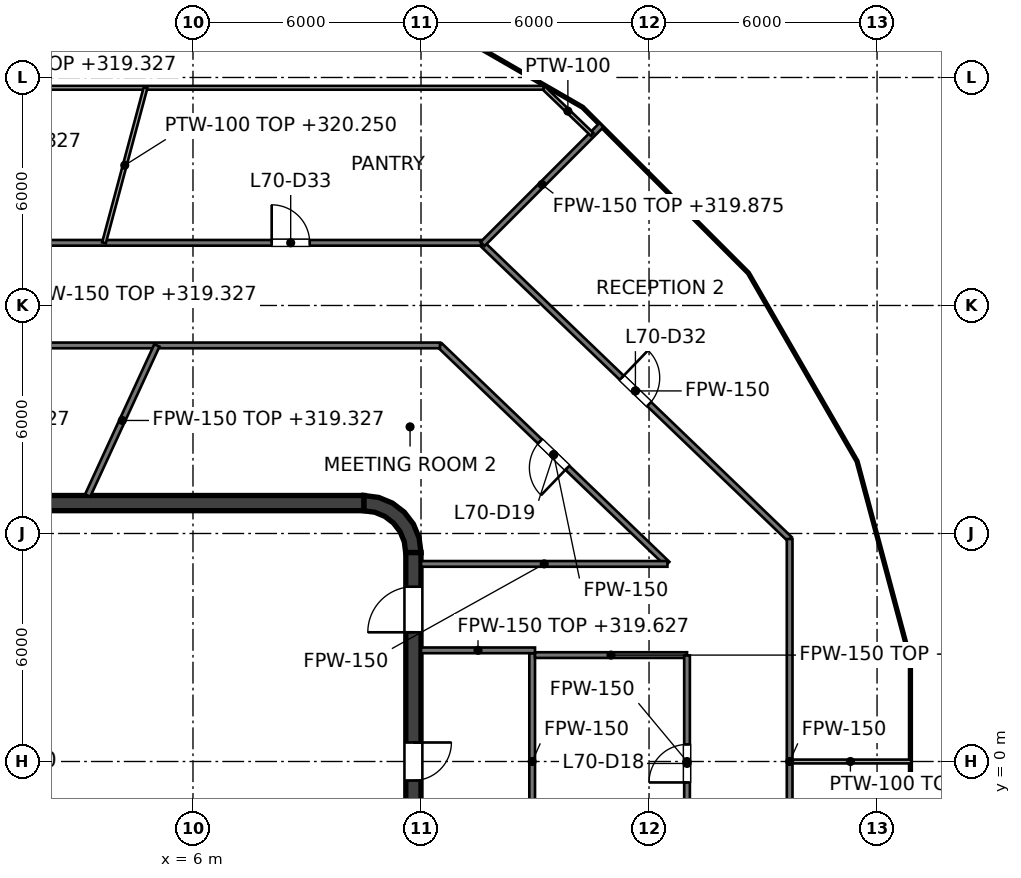
"""IFC4 building model, lengths in metres.
Left out: names, types, materials, properties, quantities, classifications, styles, units other than length and angle.
Written with IfcOpenShell. Run it as: python <this file> out.ifc"""

import sys

from ifc_helpers import new_model, si_unit, direction, frame, frame_2d, origin, place, context, subcontext, project, spatial, polyline, rectangle, outline, extrude, element, fill, save


model = new_model("IFC4")
c1 = context("Model", 3, precision=1e-05, world=origin(), true_north=direction((0.0, 1.0)))
c2 = subcontext(c1, "Body", "Model", "MODEL_VIEW")
j1 = project(units=[si_unit("LENGTHUNIT", "METRE"), si_unit("PLANEANGLEUNIT", "RADIAN")], contexts=[c1])
p1 = place(None, origin())
s1 = spatial("IfcSite", under=j1, at=p1, CompositionType="ELEMENT")
p2 = place(p1, origin())
s2 = spatial("IfcBuilding", under=s1, at=p2, CompositionType="ELEMENT")
p3 = place(p2, frame((0.0, 0.0, 316.4)))
s3 = spatial("IfcBuildingStorey", under=s2, at=p3, CompositionType="ELEMENT", Elevation=316.4)
p4 = place(p3, frame((-10.5, 6.8, 0.0), z_axis=(0.0, 0.0, 1.0), x_axis=(1.0, 0.0, 0.0)))
e1 = element("IfcWall", 1, at=p4, inside=s3, PredefinedType="SHEAR", context=c2, shape_type="SweptSolid", body=[
    extrude(rectangle(XDim=21.0, YDim=0.4, at=frame_2d((10.5, 0.0))), origin(), (0.0, 0.0, 1.0), 4.0),
])
p5 = place(p3, frame((11.8, -5.5, 0.0), z_axis=(0.0, 0.0, 1.0), x_axis=(0.0, 1.0, 0.0)))
e2 = element("IfcWall", 2, at=p5, inside=s3, PredefinedType="SHEAR", context=c2, shape_type="SweptSolid", body=[
    extrude(rectangle(XDim=11.0, YDim=0.4, at=frame_2d((5.5, 0.0))), origin(), (0.0, 0.0, 1.0), 4.0),
])
p6 = place(p5, frame((5.0, 0.0, 0.0)))
e3 = element("IfcOpeningElement", 3, at=p6, cuts=e2, PredefinedType="OPENING", context=c2, shape_type="SweptSolid", body=[
    extrude(rectangle(XDim=1.0, YDim=2.1, at=frame_2d((0.5, 1.05))), frame((0.0, 0.2, 0.0), z_axis=(0.0, -1.0, 0.0), x_axis=(1.0, 0.0, 0.0)), (0.0, 0.0, 1.0), 0.4),
])
p7 = place(p5, frame((0.9, 0.0, 0.0)))
e4 = element("IfcOpeningElement", 4, at=p7, cuts=e2, PredefinedType="OPENING", context=c2, shape_type="SweptSolid", body=[
    extrude(rectangle(XDim=1.2, YDim=2.1, at=frame_2d((0.6, 1.05))), frame((0.0, 0.2, 0.0), z_axis=(0.0, -1.0, 0.0), x_axis=(1.0, 0.0, 0.0)), (0.0, 0.0, 1.0), 0.4),
])
p8 = place(p5, frame((8.9, 0.0, 0.0)))
e5 = element("IfcOpeningElement", 5, at=p8, cuts=e2, PredefinedType="OPENING", context=c2, shape_type="SweptSolid", body=[
    extrude(rectangle(XDim=1.2, YDim=2.1, at=frame_2d((0.6, 1.05))), frame((0.0, 0.2, 0.0), z_axis=(0.0, -1.0, 0.0), x_axis=(1.0, 0.0, 0.0)), (0.0, 0.0, 1.0), 0.4),
])
p9 = place(p3, origin())
e6 = element("IfcWall", 6, at=p9, inside=s3, PredefinedType="SHEAR", context=c2, shape_type="SweptSolid", body=[
    extrude(outline(polyline([(10.5, 7.0), (10.5, 6.596), (10.784, 6.559), (11.048, 6.45), (11.275, 6.275), (11.45, 6.048), (11.559, 5.784), (11.596, 5.5), (12.0, 5.5), (11.949, 5.888), (11.799, 6.25), (11.561, 6.561), (11.25, 6.799), (10.888, 6.949), (10.5, 7.0)])), origin(), (0.0, 0.0, 1.0), 4.0),
])
p10 = place(p3, frame((9.0, 4.1, 0.0), z_axis=(0.0, 0.0, 1.0), x_axis=(0.0, 1.0, 0.0)))
e7 = element("IfcWall", 7, at=p10, inside=s3, PredefinedType="SOLIDWALL", context=c2, shape_type="SweptSolid", body=[
    extrude(rectangle(XDim=2.5, YDim=0.25, at=frame_2d((1.25, 0.0))), origin(), (0.0, 0.0, 1.0), 3.85),
])
p11 = place(p10, frame((0.65, 0.0, 0.0)))
e8 = element("IfcOpeningElement", 8, at=p11, cuts=e7, PredefinedType="OPENING", context=c2, shape_type="SweptSolid", body=[
    extrude(rectangle(XDim=1.2, YDim=2.1, at=frame_2d((0.6, 1.05))), frame((0.0, 0.125, 0.0), z_axis=(0.0, -1.0, 0.0), x_axis=(1.0, 0.0, 0.0)), (0.0, 0.0, 1.0), 0.25),
])
p12 = place(p3, frame((3.15, 4.1, 0.0), z_axis=(0.0, 0.0, 1.0), x_axis=(0.0, 1.0, 0.0)))
e9 = element("IfcWall", 9, at=p12, inside=s3, PredefinedType="SOLIDWALL", context=c2, shape_type="SweptSolid", body=[
    extrude(rectangle(XDim=2.5, YDim=0.25, at=frame_2d((1.25, 0.0))), origin(), (0.0, 0.0, 1.0), 3.85),
])
p13 = place(p3, frame((0.775, 1.525, 0.0), z_axis=(0.0, 0.0, 1.0), x_axis=(1.0, 0.0, 0.0)))
e10 = element("IfcWall", 10, at=p13, inside=s3, PredefinedType="SOLIDWALL", context=c2, shape_type="SweptSolid", body=[
    extrude(rectangle(XDim=8.35, YDim=0.25, at=frame_2d((4.175, 0.0))), origin(), (0.0, 0.0, 1.0), 3.85),
])
p14 = place(p13, frame((0.925, 0.0, 0.0)))
e11 = element("IfcOpeningElement", 11, at=p14, cuts=e10, PredefinedType="OPENING", context=c2, shape_type="SweptSolid", body=[
    extrude(rectangle(XDim=1.1, YDim=2.1, at=frame_2d((0.55, 1.05))), frame((0.0, 0.125, 0.0), z_axis=(0.0, -1.0, 0.0), x_axis=(1.0, 0.0, 0.0)), (0.0, 0.0, 1.0), 0.25),
])
p15 = place(p13, frame((3.625, 0.0, 0.0)))
e12 = element("IfcOpeningElement", 12, at=p15, cuts=e10, PredefinedType="OPENING", context=c2, shape_type="SweptSolid", body=[
    extrude(rectangle(XDim=1.1, YDim=2.1, at=frame_2d((0.55, 1.05))), frame((0.0, 0.125, 0.0), z_axis=(0.0, -1.0, 0.0), x_axis=(1.0, 0.0, 0.0)), (0.0, 0.0, 1.0), 0.25),
])
p16 = place(p13, frame((6.325, 0.0, 0.0)))
e13 = element("IfcOpeningElement", 13, at=p16, cuts=e10, PredefinedType="OPENING", context=c2, shape_type="SweptSolid", body=[
    extrude(rectangle(XDim=1.1, YDim=2.1, at=frame_2d((0.55, 1.05))), frame((0.0, 0.125, 0.0), z_axis=(0.0, -1.0, 0.0), x_axis=(1.0, 0.0, 0.0)), (0.0, 0.0, 1.0), 0.25),
])
p17 = place(p3, frame((0.775, 3.975, 0.0), z_axis=(0.0, 0.0, 1.0), x_axis=(1.0, 0.0, 0.0)))
e14 = element("IfcWall", 14, at=p17, inside=s3, PredefinedType="SOLIDWALL", context=c2, shape_type="SweptSolid", body=[
    extrude(rectangle(XDim=8.35, YDim=0.25, at=frame_2d((4.175, 0.0))), origin(), (0.0, 0.0, 1.0), 3.85),
])
for number, where, z_axis, x_axis in (
    (15, (9.0, 1.65, 0.0), (0.0, 0.0, 1.0), (0.0, 1.0, 0.0)),
    (16, (6.3, 1.65, 0.0), (0.0, 0.0, 1.0), (0.0, 1.0, 0.0)),
    (17, (3.6, 1.65, 0.0), (0.0, 0.0, 1.0), (0.0, 1.0, 0.0)),
):
    element("IfcWall", number, at=place(p3, frame(where, z_axis=z_axis, x_axis=x_axis)), inside=s3, PredefinedType="SOLIDWALL", context=c2, shape_type="SweptSolid", body=[
        extrude(rectangle(XDim=2.2, YDim=0.25, at=frame_2d((1.1, 0.0))), origin(), (0.0, 0.0, 1.0), 3.85),
    ])
p18 = place(p3, frame((14.925, -2.85, 0.0), z_axis=(0.0, 0.0, 1.0), x_axis=(0.0, 1.0, 0.0)))
e18 = element("IfcWall", 18, at=p18, inside=s3, PredefinedType="PARTITIONING", context=c2, shape_type="SweptSolid", body=[
    extrude(rectangle(XDim=5.7, YDim=0.15, at=frame_2d((2.85, 0.0))), origin(), (0.0, 0.0, 1.0), 3.076),
])
p19 = place(p3, frame((12.0, 2.925, 0.0), z_axis=(0.0, 0.0, 1.0), x_axis=(1.0, 0.0, 0.0)))
e19 = element("IfcWall", 19, at=p19, inside=s3, PredefinedType="PARTITIONING", context=c2, shape_type="SweptSolid", body=[
    extrude(rectangle(XDim=3.0, YDim=0.15, at=frame_2d((1.5, 0.0))), origin(), (0.0, 0.0, 1.0), 3.228),
])
p20 = place(p3, frame((12.498, 10.949, 0.0), z_axis=(0.0, 0.0, 1.0), x_axis=(0.721258572397, -0.692665916401, 0.0)))
e20 = element("IfcWall", 20, at=p20, inside=s3, PredefinedType="PARTITIONING", context=c2, shape_type="SweptSolid", body=[
    extrude(rectangle(XDim=8.3, YDim=0.15, at=frame_2d((4.15, 0.0))), origin(), (0.0, 0.0, 1.0), 3.076),
])
p21 = place(p20, frame((3.649, 0.0, 0.0)))
e21 = element("IfcOpeningElement", 21, at=p21, cuts=e20, PredefinedType="OPENING", context=c2, shape_type="SweptSolid", body=[
    extrude(rectangle(XDim=1.0, YDim=2.1, at=frame_2d((0.5, 1.05))), frame((0.0, 0.075, 0.0), z_axis=(0.0, -1.0, 0.0), x_axis=(1.0, 0.0, 0.0)), (0.0, 0.0, 1.0), 0.15),
])
p22 = place(p3, frame((13.584, 13.649, 0.0), z_axis=(0.0, 0.0, 1.0), x_axis=(0.721271112153, -0.692652858778, 0.0)))
e22 = element("IfcWall", 22, at=p22, inside=s3, PredefinedType="PARTITIONING", context=c2, shape_type="SweptSolid", body=[
    extrude(rectangle(XDim=11.252, YDim=0.15, at=frame_2d((5.626, 0.0))), origin(), (0.0, 0.0, 1.0), 3.076),
])
p23 = place(p22, frame((5.126, 0.0, 0.0)))
e23 = element("IfcOpeningElement", 23, at=p23, cuts=e22, PredefinedType="OPENING", context=c2, shape_type="SweptSolid", body=[
    extrude(rectangle(XDim=1.0, YDim=2.1, at=frame_2d((0.5, 1.05))), frame((0.0, 0.075, 0.0), z_axis=(0.0, -1.0, 0.0), x_axis=(1.0, 0.0, 0.0)), (0.0, 0.0, 1.0), 0.15),
])
p24 = place(p3, frame((15.0, 2.8, 0.0), z_axis=(0.0, 0.0, 1.0), x_axis=(1.0, 0.0, 0.0)))
e24 = element("IfcWall", 24, at=p24, inside=s3, PredefinedType="PARTITIONING", context=c2, shape_type="SweptSolid", body=[
    extrude(rectangle(XDim=4.0, YDim=0.15, at=frame_2d((2.0, 0.0))), origin(), (0.0, 0.0, 1.0), 3.85),
])
p25 = place(p3, frame((12.0, 5.2, 0.0), z_axis=(0.0, 0.0, 1.0), x_axis=(1.0, 0.0, 0.0)))
e25 = element("IfcWall", 25, at=p25, inside=s3, PredefinedType="PARTITIONING", context=c2, shape_type="SweptSolid", body=[
    extrude(rectangle(XDim=6.484, YDim=0.15, at=frame_2d((3.242, 0.0))), origin(), (0.0, 0.0, 1.0), 3.076),
])
p26 = place(p3, frame((-12.498, 10.949, 0.0), z_axis=(0.0, 0.0, 1.0), x_axis=(1.0, 0.0, 0.0)))
e26 = element("IfcWall", 26, at=p26, inside=s3, PredefinedType="PARTITIONING", context=c2, shape_type="SweptSolid", body=[
    extrude(rectangle(XDim=24.996, YDim=0.15, at=frame_2d((12.498, 0.0))), origin(), (0.0, 0.0, 1.0), 2.927),
])
p27 = place(p26, frame((11.948, 0.0, 0.0)))
e27 = element("IfcOpeningElement", 27, at=p27, cuts=e26, PredefinedType="OPENING", context=c2, shape_type="SweptSolid", body=[
    extrude(rectangle(XDim=1.0, YDim=2.1, at=frame_2d((0.5, 1.05))), frame((0.0, 0.075, 0.0), z_axis=(0.0, -1.0, 0.0), x_axis=(1.0, 0.0, 0.0)), (0.0, 0.0, 1.0), 0.15),
])
p28 = place(p3, frame((-13.584, 13.649, 0.0), z_axis=(0.0, 0.0, 1.0), x_axis=(1.0, 0.0, 0.0)))
e28 = element("IfcWall", 28, at=p28, inside=s3, PredefinedType="PARTITIONING", context=c2, shape_type="SweptSolid", body=[
    extrude(rectangle(XDim=27.168, YDim=0.15, at=frame_2d((13.584, 0.0))), origin(), (0.0, 0.0, 1.0), 2.927),
])
p29 = place(p28, frame((21.655, 0.0, 0.0)))
e29 = element("IfcOpeningElement", 29, at=p29, cuts=e28, PredefinedType="OPENING", context=c2, shape_type="SweptSolid", body=[
    extrude(rectangle(XDim=1.0, YDim=2.1, at=frame_2d((0.5, 1.05))), frame((0.0, 0.075, 0.0), z_axis=(0.0, -1.0, 0.0), x_axis=(1.0, 0.0, 0.0)), (0.0, 0.0, 1.0), 0.15),
])
p30 = place(p28, frame((10.923, 0.0, 0.0)))
e30 = element("IfcOpeningElement", 30, at=p30, cuts=e28, PredefinedType="OPENING", context=c2, shape_type="SweptSolid", body=[
    extrude(rectangle(XDim=1.0, YDim=2.1, at=frame_2d((0.5, 1.05))), frame((0.0, 0.075, 0.0), z_axis=(0.0, -1.0, 0.0), x_axis=(1.0, 0.0, 0.0)), (0.0, 0.0, 1.0), 0.15),
])
p31 = place(p3, frame((13.618, 13.617, 0.0), z_axis=(0.0, 0.0, 1.0), x_axis=(0.707106781187, 0.707106781187, 0.0)))
e31 = element("IfcWall", 31, at=p31, inside=s3, PredefinedType="PARTITIONING", context=c2, shape_type="SweptSolid", body=[
    extrude(rectangle(XDim=4.428, YDim=0.15, at=frame_2d((2.214, 0.0))), origin(), (0.0, 0.0, 1.0), 3.475),
])
p32 = place(p3, frame((3.229, 7.0, 0.0), z_axis=(0.0, 0.0, 1.0), x_axis=(0.418762657012, 0.908095720226, 0.0)))
e32 = element("IfcWall", 32, at=p32, inside=s3, PredefinedType="PARTITIONING", context=c2, shape_type="SweptSolid", body=[
    extrude(rectangle(XDim=4.349, YDim=0.15, at=frame_2d((2.174, 0.0))), origin(), (0.0, 0.0, 1.0), 2.927),
])
p33 = place(p3, frame((21.7, -5.855, 0.0), z_axis=(0.0, 0.0, 1.0), x_axis=(0.0, 1.0, 0.0)))
e33 = element("IfcWall", 33, at=p33, inside=s3, PredefinedType="PARTITIONING", context=c2, shape_type="SweptSolid", body=[
    extrude(rectangle(XDim=11.71, YDim=0.15, at=frame_2d((5.855, 0.0))), origin(), (0.0, 0.0, 1.0), 3.076),
])
p34 = place(p3, frame((19.0, -2.79, 0.0), z_axis=(0.0, 0.0, 1.0), x_axis=(0.0, 1.0, 0.0)))
e34 = element("IfcWall", 34, at=p34, inside=s3, PredefinedType="PARTITIONING", context=c2, shape_type="SweptSolid", body=[
    extrude(rectangle(XDim=5.58, YDim=0.15, at=frame_2d((2.79, 0.0))), origin(), (0.0, 0.0, 1.0), 3.076),
])
p35 = place(p34, frame((2.239, 0.0, 0.0)))
e35 = element("IfcOpeningElement", 35, at=p35, cuts=e34, PredefinedType="OPENING", context=c2, shape_type="SweptSolid", body=[
    extrude(rectangle(XDim=1.0, YDim=2.1, at=frame_2d((0.5, 1.05))), frame((0.0, 0.075, 0.0), z_axis=(0.0, -1.0, 0.0), x_axis=(1.0, 0.0, 0.0)), (0.0, 0.0, 1.0), 0.15),
])
p36 = place(p3, frame((15.226, 17.729, 0.0), z_axis=(0.0, 0.0, 1.0), x_axis=(0.72116413062, -0.692764243236, 0.0)))
e36 = element("IfcWall", 36, at=p36, inside=s3, PredefinedType="PARTITIONING", context=c2, shape_type="SweptSolid", body=[
    extrude(rectangle(XDim=1.771, YDim=0.1, at=frame_2d((0.885, 0.0))), origin(), (0.0, 0.0, 1.0), 2.995),
])
p37 = place(p3, frame((21.7, 0.0, 0.0), z_axis=(0.0, 0.0, 1.0), x_axis=(1.0, 0.0, 0.0)))
e37 = element("IfcWall", 37, at=p37, inside=s3, PredefinedType="PARTITIONING", context=c2, shape_type="SweptSolid", body=[
    extrude(rectangle(XDim=3.198, YDim=0.1, at=frame_2d((1.599, 0.0))), origin(), (0.0, 0.0, 1.0), 3.152),
])
p38 = place(p3, frame((-15.226, 17.729, 0.0), z_axis=(0.0, 0.0, 1.0), x_axis=(1.0, 0.0, 0.0)))
e38 = element("IfcWall", 38, at=p38, inside=s3, PredefinedType="PARTITIONING", context=c2, shape_type="SweptSolid", body=[
    extrude(rectangle(XDim=30.452, YDim=0.1, at=frame_2d((15.226, 0.0))), origin(), (0.0, 0.0, 1.0), 2.927),
])
p39 = place(p38, frame((2.045, 0.0, 0.0)))
e39 = element("IfcOpeningElement", 39, at=p39, cuts=e38, PredefinedType="OPENING", context=c2, shape_type="SweptSolid", body=[
    extrude(rectangle(XDim=0.9, YDim=2.1, at=frame_2d((0.45, 1.05))), frame((0.0, 0.05, 0.0), z_axis=(0.0, -1.0, 0.0), x_axis=(1.0, 0.0, 0.0)), (0.0, 0.0, 1.0), 0.1),
])
p40 = place(p38, frame((12.033, 0.0, 0.0)))
e40 = element("IfcOpeningElement", 40, at=p40, cuts=e38, PredefinedType="OPENING", context=c2, shape_type="SweptSolid", body=[
    extrude(rectangle(XDim=0.9, YDim=2.1, at=frame_2d((0.45, 1.05))), frame((0.0, 0.05, 0.0), z_axis=(0.0, -1.0, 0.0), x_axis=(1.0, 0.0, 0.0)), (0.0, 0.0, 1.0), 0.1),
])
p41 = place(p3, frame((3.658, 13.649, 0.0), z_axis=(0.0, 0.0, 1.0), x_axis=(0.258766902147, 0.965939796444, 0.0)))
e41 = element("IfcWall", 41, at=p41, inside=s3, PredefinedType="PARTITIONING", context=c2, shape_type="SweptSolid", body=[
    extrude(rectangle(XDim=4.224, YDim=0.1, at=frame_2d((2.112, 0.0))), origin(), (0.0, 0.0, 1.0), 3.85),
])
p42 = place(p14, origin())
e42 = element("IfcDoor", 42, at=p42, inside=s3, OperationType="DOUBLE_DOOR_SLIDING", PredefinedType="DOOR", context=c2, shape_type="SweptSolid", body=[
    extrude(rectangle(XDim=1.1, YDim=2.1, at=frame_2d((0.55, 1.05))), frame((0.0, 0.025, 0.0), z_axis=(0.0, -1.0, 0.0), x_axis=(1.0, 0.0, 0.0)), (0.0, 0.0, 1.0), 0.05),
])
fill(e11, e42)
p43 = place(p15, origin())
e43 = element("IfcDoor", 43, at=p43, inside=s3, OperationType="DOUBLE_DOOR_SLIDING", PredefinedType="DOOR", context=c2, shape_type="SweptSolid", body=[
    extrude(rectangle(XDim=1.1, YDim=2.1, at=frame_2d((0.55, 1.05))), frame((0.0, 0.025, 0.0), z_axis=(0.0, -1.0, 0.0), x_axis=(1.0, 0.0, 0.0)), (0.0, 0.0, 1.0), 0.05),
])
fill(e12, e43)
p44 = place(p16, origin())
e44 = element("IfcDoor", 44, at=p44, inside=s3, OperationType="DOUBLE_DOOR_SLIDING", PredefinedType="DOOR", context=c2, shape_type="SweptSolid", body=[
    extrude(rectangle(XDim=1.1, YDim=2.1, at=frame_2d((0.55, 1.05))), frame((0.0, 0.025, 0.0), z_axis=(0.0, -1.0, 0.0), x_axis=(1.0, 0.0, 0.0)), (0.0, 0.0, 1.0), 0.05),
])
fill(e13, e44)
p45 = place(p11, origin())
e45 = element("IfcDoor", 45, at=p45, inside=s3, OperationType="SINGLE_SWING_LEFT", PredefinedType="DOOR", context=c2, shape_type="SweptSolid", body=[
    extrude(rectangle(XDim=1.2, YDim=2.1, at=frame_2d((0.6, 1.05))), frame((0.0, 0.025, 0.0), z_axis=(0.0, -1.0, 0.0), x_axis=(1.0, 0.0, 0.0)), (0.0, 0.0, 1.0), 0.05),
])
fill(e8, e45)
p46 = place(p6, origin())
e46 = element("IfcDoor", 46, at=p46, inside=s3, OperationType="SINGLE_SWING_RIGHT", PredefinedType="DOOR", context=c2, shape_type="SweptSolid", body=[
    extrude(rectangle(XDim=1.0, YDim=2.1, at=frame_2d((0.5, 1.05))), frame((0.0, 0.025, 0.0), z_axis=(0.0, -1.0, 0.0), x_axis=(1.0, 0.0, 0.0)), (0.0, 0.0, 1.0), 0.05),
])
fill(e3, e46)
p47 = place(p8, origin())
e47 = element("IfcDoor", 47, at=p47, inside=s3, OperationType="SINGLE_SWING_LEFT", PredefinedType="DOOR", context=c2, shape_type="SweptSolid", body=[
    extrude(rectangle(XDim=1.2, YDim=2.1, at=frame_2d((0.6, 1.05))), frame((0.0, 0.025, 0.0), z_axis=(0.0, -1.0, 0.0), x_axis=(1.0, 0.0, 0.0)), (0.0, 0.0, 1.0), 0.05),
])
fill(e5, e47)
p48 = place(p35, origin())
e48 = element("IfcDoor", 48, at=p48, inside=s3, OperationType="SINGLE_SWING_LEFT", PredefinedType="DOOR", context=c2, shape_type="SweptSolid", body=[
    extrude(rectangle(XDim=1.0, YDim=2.1, at=frame_2d((0.5, 1.05))), frame((0.0, 0.025, 0.0), z_axis=(0.0, -1.0, 0.0), x_axis=(1.0, 0.0, 0.0)), (0.0, 0.0, 1.0), 0.05),
])
fill(e35, e48)
p49 = place(p21, origin())
e49 = element("IfcDoor", 49, at=p49, inside=s3, OperationType="SINGLE_SWING_RIGHT", PredefinedType="DOOR", context=c2, shape_type="SweptSolid", body=[
    extrude(rectangle(XDim=1.0, YDim=2.1, at=frame_2d((0.5, 1.05))), frame((0.0, 0.025, 0.0), z_axis=(0.0, -1.0, 0.0), x_axis=(1.0, 0.0, 0.0)), (0.0, 0.0, 1.0), 0.05),
])
fill(e21, e49)
p50 = place(p23, origin())
e50 = element("IfcDoor", 50, at=p50, inside=s3, OperationType="SINGLE_SWING_LEFT", PredefinedType="DOOR", context=c2, shape_type="SweptSolid", body=[
    extrude(rectangle(XDim=1.0, YDim=2.1, at=frame_2d((0.5, 1.05))), frame((0.0, 0.025, 0.0), z_axis=(0.0, -1.0, 0.0), x_axis=(1.0, 0.0, 0.0)), (0.0, 0.0, 1.0), 0.05),
])
fill(e23, e50)
p51 = place(p29, origin())
e51 = element("IfcDoor", 51, at=p51, inside=s3, OperationType="SINGLE_SWING_LEFT", PredefinedType="DOOR", context=c2, shape_type="SweptSolid", body=[
    extrude(rectangle(XDim=1.0, YDim=2.1, at=frame_2d((0.5, 1.05))), frame((0.0, 0.025, 0.0), z_axis=(0.0, -1.0, 0.0), x_axis=(1.0, 0.0, 0.0)), (0.0, 0.0, 1.0), 0.05),
])
fill(e29, e51)
save(model, sys.argv[1])
